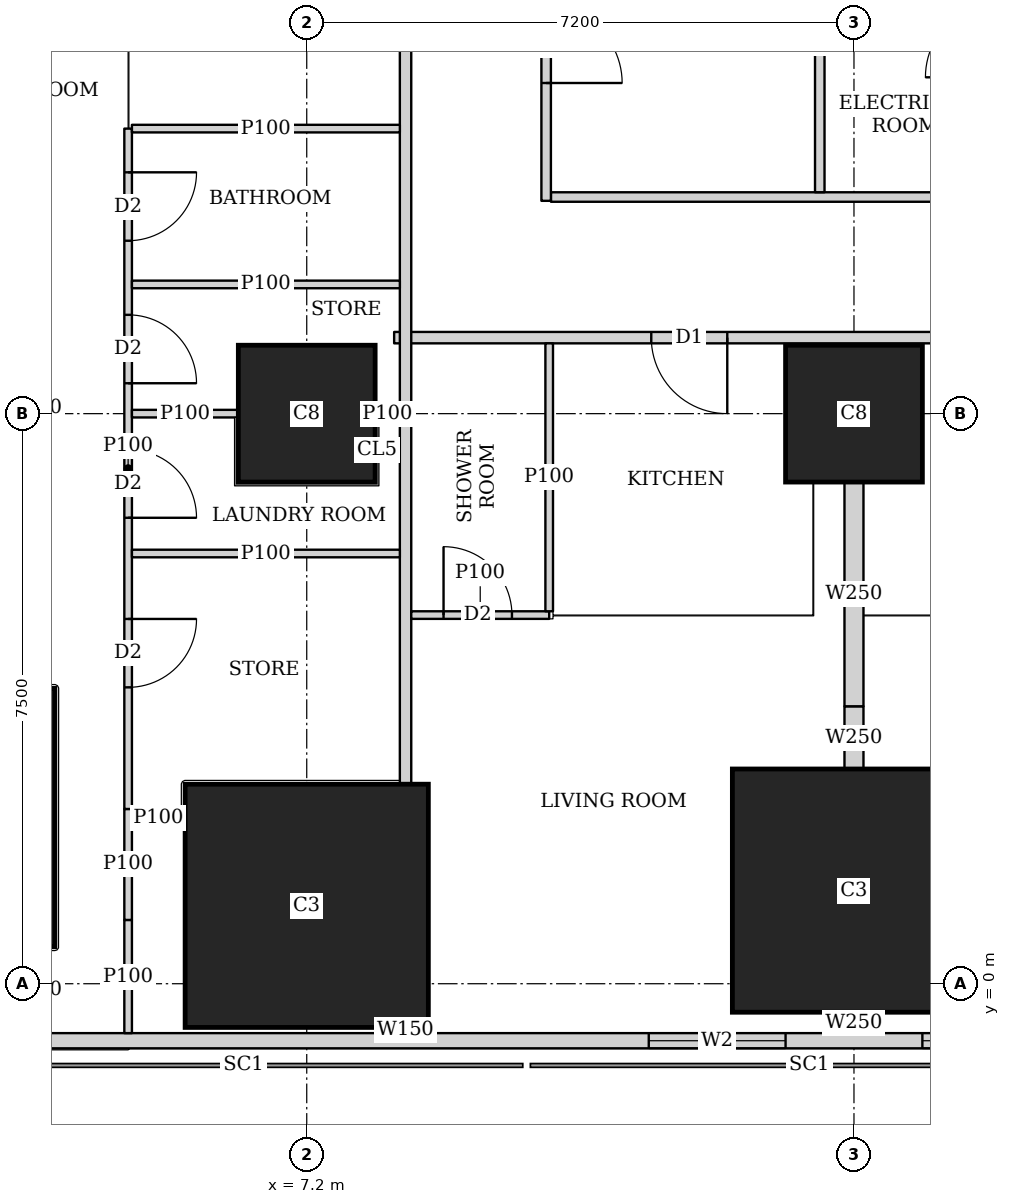
"""IFC4 building model, lengths in metres.
Left out: names, types, materials, properties, quantities, classifications, styles, units other than length and angle.
Written with IfcOpenShell. Run it as: python <this file> out.ifc"""

import sys

from ifc_helpers import new_model, si_unit, direction, frame, frame_2d, origin, origin_2d, place, context, subcontext, project, spatial, rectangle, extrude, element, fill, save


model = new_model("IFC4")
c1 = context("Model", 3, precision=1e-05, world=origin(), true_north=direction((0.0, 1.0)))
c2 = subcontext(c1, "Body", "Model", "MODEL_VIEW")
j1 = project(units=[si_unit("LENGTHUNIT", "METRE"), si_unit("PLANEANGLEUNIT", "RADIAN")], contexts=[c1])
p1 = place(None, origin())
s1 = spatial("IfcSite", under=j1, at=p1, CompositionType="ELEMENT")
p2 = place(p1, origin())
s2 = spatial("IfcBuilding", under=s1, at=p2, CompositionType="ELEMENT")
p3 = place(p2, frame((0.0, 0.0, 20.0)))
s3 = spatial("IfcBuildingStorey", under=s2, at=p3, CompositionType="ELEMENT", Elevation=20.0)
p4 = place(p3, frame((7.2, 1.025, -0.3), z_axis=(0.0, 0.0, 1.0), x_axis=(1.0, 0.0, 0.0)))
e1 = element("IfcColumn", 1, at=p4, inside=s3, PredefinedType="COLUMN", context=c2, shape_type="SweptSolid", body=[
    extrude(rectangle(XDim=3.2, YDim=3.2, at=origin_2d()), origin(), (0.0, 0.0, 1.0), 4.05),
])
p5 = place(p3, frame((14.4, 1.225, 0.0), z_axis=(0.0, 0.0, 1.0), x_axis=(1.0, 0.0, 0.0)))
e2 = element("IfcColumn", 2, at=p5, inside=s3, PredefinedType="COLUMN", context=c2, shape_type="SweptSolid", body=[
    extrude(rectangle(XDim=3.2, YDim=3.2, at=origin_2d()), origin(), (0.0, 0.0, 1.0), 3.75),
])
p6 = place(p3, frame((2.186, 2.186, 0.0), z_axis=(0.0, 0.0, 1.0), x_axis=(1.0, 0.0, 0.0)))
e3 = element("IfcColumn", 3, at=p6, inside=s3, PredefinedType="COLUMN", context=c2, shape_type="SweptSolid", body=[
    extrude(rectangle(XDim=3.4, YDim=3.4, at=origin_2d()), origin(), (0.0, 0.0, 1.0), 3.75),
])
for number, where, z_axis, x_axis in (
    (4, (7.2, 7.5, 0.0), (0.0, 0.0, 1.0), (1.0, 0.0, 0.0)),
    (5, (14.4, 7.5, 0.0), (0.0, 0.0, 1.0), (1.0, 0.0, 0.0)),
):
    element("IfcColumn", number, at=place(p3, frame(where, z_axis=z_axis, x_axis=x_axis)), inside=s3, PredefinedType="COLUMN", context=c2, shape_type="SweptSolid", body=[
        extrude(rectangle(XDim=1.8, YDim=1.8, at=origin_2d()), origin(), (0.0, 0.0, 1.0), 3.75),
    ])
p7 = place(p3, frame((2.163, -0.75, 0.0), z_axis=(0.0, 0.0, 1.0), x_axis=(1.0, 0.0, 0.0)))
e6 = element("IfcWall", 6, at=p7, inside=s3, PredefinedType="SOLIDWALL", context=c2, shape_type="SweptSolid", body=[
    extrude(rectangle(XDim=45.628, YDim=0.2, at=frame_2d((22.814, 0.0))), origin(), (0.0, 0.0, 1.0), 3.5),
])
p8 = place(p7, frame((9.537, 0.0, 0.9)))
e7 = element("IfcOpeningElement", 7, at=p8, cuts=e6, PredefinedType="OPENING", context=c2, shape_type="SweptSolid", body=[
    extrude(rectangle(XDim=1.8, YDim=1.5, at=frame_2d((0.9, 0.75))), frame((0.0, 0.11, 0.0), z_axis=(0.0, -1.0, 0.0), x_axis=(1.0, 0.0, 0.0)), (0.0, 0.0, 1.0), 0.22),
])
p9 = place(p7, frame((13.137, 0.0, 0.9)))
e8 = element("IfcOpeningElement", 8, at=p9, cuts=e6, PredefinedType="OPENING", context=c2, shape_type="SweptSolid", body=[
    extrude(rectangle(XDim=1.8, YDim=1.5, at=frame_2d((0.9, 0.75))), frame((0.0, 0.11, 0.0), z_axis=(0.0, -1.0, 0.0), x_axis=(1.0, 0.0, 0.0)), (0.0, 0.0, 1.0), 0.22),
])
p10 = place(p7, frame((16.737, 0.0, 0.9)))
e9 = element("IfcOpeningElement", 9, at=p10, cuts=e6, PredefinedType="OPENING", context=c2, shape_type="SweptSolid", body=[
    extrude(rectangle(XDim=1.8, YDim=1.5, at=frame_2d((0.9, 0.75))), frame((0.0, 0.11, 0.0), z_axis=(0.0, -1.0, 0.0), x_axis=(1.0, 0.0, 0.0)), (0.0, 0.0, 1.0), 0.22),
])
p11 = place(p7, frame((20.337, 0.0, 0.9)))
e10 = element("IfcOpeningElement", 10, at=p11, cuts=e6, PredefinedType="OPENING", context=c2, shape_type="SweptSolid", body=[
    extrude(rectangle(XDim=1.8, YDim=1.5, at=frame_2d((0.9, 0.75))), frame((0.0, 0.11, 0.0), z_axis=(0.0, -1.0, 0.0), x_axis=(1.0, 0.0, 0.0)), (0.0, 0.0, 1.0), 0.22),
])
p12 = place(p7, frame((23.937, 0.0, 0.9)))
e11 = element("IfcOpeningElement", 11, at=p12, cuts=e6, PredefinedType="OPENING", context=c2, shape_type="SweptSolid", body=[
    extrude(rectangle(XDim=1.8, YDim=1.5, at=frame_2d((0.9, 0.75))), frame((0.0, 0.11, 0.0), z_axis=(0.0, -1.0, 0.0), x_axis=(1.0, 0.0, 0.0)), (0.0, 0.0, 1.0), 0.22),
])
p13 = place(p7, frame((27.537, 0.0, 0.9)))
e12 = element("IfcOpeningElement", 12, at=p13, cuts=e6, PredefinedType="OPENING", context=c2, shape_type="SweptSolid", body=[
    extrude(rectangle(XDim=1.8, YDim=1.5, at=frame_2d((0.9, 0.75))), frame((0.0, 0.11, 0.0), z_axis=(0.0, -1.0, 0.0), x_axis=(1.0, 0.0, 0.0)), (0.0, 0.0, 1.0), 0.22),
])
p14 = place(p7, frame((31.137, 0.0, 0.9)))
e13 = element("IfcOpeningElement", 13, at=p14, cuts=e6, PredefinedType="OPENING", context=c2, shape_type="SweptSolid", body=[
    extrude(rectangle(XDim=1.8, YDim=1.5, at=frame_2d((0.9, 0.75))), frame((0.0, 0.11, 0.0), z_axis=(0.0, -1.0, 0.0), x_axis=(1.0, 0.0, 0.0)), (0.0, 0.0, 1.0), 0.22),
])
p15 = place(p7, frame((34.737, 0.0, 0.9)))
e14 = element("IfcOpeningElement", 14, at=p15, cuts=e6, PredefinedType="OPENING", context=c2, shape_type="SweptSolid", body=[
    extrude(rectangle(XDim=1.8, YDim=1.5, at=frame_2d((0.9, 0.75))), frame((0.0, 0.11, 0.0), z_axis=(0.0, -1.0, 0.0), x_axis=(1.0, 0.0, 0.0)), (0.0, 0.0, 1.0), 0.22),
])
p16 = place(p3, frame((8.5, -0.65, 0.0), z_axis=(0.0, 0.0, 1.0), x_axis=(0.0, 1.0, 0.0)))
e15 = element("IfcWall", 15, at=p16, inside=s3, PredefinedType="SOLIDWALL", context=c2, shape_type="SweptSolid", body=[
    extrude(rectangle(XDim=0.074, YDim=0.15, at=frame_2d((0.037, 0.0))), origin(), (0.0, 0.0, 1.0), 3.5),
])
p17 = place(p3, frame((8.5, 2.626, 0.0), z_axis=(0.0, 0.0, 1.0), x_axis=(0.0, 1.0, 0.0)))
e16 = element("IfcWall", 16, at=p17, inside=s3, PredefinedType="SOLIDWALL", context=c2, shape_type="SweptSolid", body=[
    extrude(rectangle(XDim=39.773, YDim=0.15, at=frame_2d((19.886, 0.0))), origin(), (0.0, 0.0, 1.0), 2.05),
])
p18 = place(p17, frame((9.786, 0.0, 0.0)))
e17 = element("IfcOpeningElement", 17, at=p18, cuts=e16, PredefinedType="OPENING", context=c2, shape_type="SweptSolid", body=[
    extrude(rectangle(XDim=1.0, YDim=2.0, at=frame_2d((0.5, 1.0))), frame((0.0, 0.085, 0.0), z_axis=(0.0, -1.0, 0.0), x_axis=(1.0, 0.0, 0.0)), (0.0, 0.0, 1.0), 0.17),
])
p19 = place(p17, frame((13.961, 0.0, 0.0)))
e18 = element("IfcOpeningElement", 18, at=p19, cuts=e16, PredefinedType="OPENING", context=c2, shape_type="SweptSolid", body=[
    extrude(rectangle(XDim=1.0, YDim=2.0, at=frame_2d((0.5, 1.0))), frame((0.0, 0.085, 0.0), z_axis=(0.0, -1.0, 0.0), x_axis=(1.0, 0.0, 0.0)), (0.0, 0.0, 1.0), 0.17),
])
p20 = place(p17, frame((24.787, 0.0, 0.0)))
e19 = element("IfcOpeningElement", 19, at=p20, cuts=e16, PredefinedType="OPENING", context=c2, shape_type="SweptSolid", body=[
    extrude(rectangle(XDim=1.0, YDim=2.0, at=frame_2d((0.5, 1.0))), frame((0.0, 0.085, 0.0), z_axis=(0.0, -1.0, 0.0), x_axis=(1.0, 0.0, 0.0)), (0.0, 0.0, 1.0), 0.17),
])
p21 = place(p17, frame((32.287, 0.0, 0.0)))
e20 = element("IfcOpeningElement", 20, at=p21, cuts=e16, PredefinedType="OPENING", context=c2, shape_type="SweptSolid", body=[
    extrude(rectangle(XDim=1.0, YDim=2.0, at=frame_2d((0.5, 1.0))), frame((0.0, 0.085, 0.0), z_axis=(0.0, -1.0, 0.0), x_axis=(1.0, 0.0, 0.0)), (0.0, 0.0, 1.0), 0.17),
])
p22 = place(p3, frame((40.054, 8.5, 0.0), z_axis=(0.0, 0.0, 1.0), x_axis=(-1.0, 0.0, 0.0)))
e21 = element("IfcWall", 21, at=p22, inside=s3, PredefinedType="SOLIDWALL", context=c2, shape_type="SweptSolid", body=[
    extrude(rectangle(XDim=31.704, YDim=0.15, at=frame_2d((15.852, 0.0))), origin(), (0.0, 0.0, 1.0), 3.5),
])
p23 = place(p22, frame((27.321, 0.0, 0.0)))
e22 = element("IfcOpeningElement", 22, at=p23, cuts=e21, PredefinedType="OPENING", context=c2, shape_type="SweptSolid", body=[
    extrude(rectangle(XDim=1.0, YDim=2.1, at=frame_2d((0.5, 1.05))), frame((0.0, 0.085, 0.0), z_axis=(0.0, -1.0, 0.0), x_axis=(1.0, 0.0, 0.0)), (0.0, 0.0, 1.0), 0.17),
])
p24 = place(p22, frame((23.054, 0.0, 0.0)))
e23 = element("IfcOpeningElement", 23, at=p24, cuts=e21, PredefinedType="OPENING", context=c2, shape_type="SweptSolid", body=[
    extrude(rectangle(XDim=1.0, YDim=2.1, at=frame_2d((0.5, 1.05))), frame((0.0, 0.085, 0.0), z_axis=(0.0, -1.0, 0.0), x_axis=(1.0, 0.0, 0.0)), (0.0, 0.0, 1.0), 0.17),
])
p25 = place(p22, frame((15.754, 0.0, 0.0)))
e24 = element("IfcOpeningElement", 24, at=p25, cuts=e21, PredefinedType="OPENING", context=c2, shape_type="SweptSolid", body=[
    extrude(rectangle(XDim=1.0, YDim=2.1, at=frame_2d((0.5, 1.05))), frame((0.0, 0.085, 0.0), z_axis=(0.0, -1.0, 0.0), x_axis=(1.0, 0.0, 0.0)), (0.0, 0.0, 1.0), 0.17),
])
p26 = place(p22, frame((5.754, 0.0, 0.0)))
e25 = element("IfcOpeningElement", 25, at=p26, cuts=e21, PredefinedType="OPENING", context=c2, shape_type="SweptSolid", body=[
    extrude(rectangle(XDim=1.0, YDim=2.1, at=frame_2d((0.5, 1.05))), frame((0.0, 0.085, 0.0), z_axis=(0.0, -1.0, 0.0), x_axis=(1.0, 0.0, 0.0)), (0.0, 0.0, 1.0), 0.17),
])
p27 = place(p3, frame((4.85, -0.65, 0.0), z_axis=(0.0, 0.0, 1.0), x_axis=(0.0, 1.0, 0.0)))
e26 = element("IfcWall", 26, at=p27, inside=s3, PredefinedType="PARTITIONING", context=c2, shape_type="SweptSolid", body=[
    extrude(rectangle(XDim=1.489, YDim=0.1, at=frame_2d((0.745, 0.0))), origin(), (0.0, 0.0, 1.0), 3.5),
])
p28 = place(p3, frame((4.85, 0.839, 0.0), z_axis=(0.0, 0.0, 1.0), x_axis=(0.0, 1.0, 0.0)))
e27 = element("IfcWall", 27, at=p28, inside=s3, PredefinedType="PARTITIONING", context=c2, shape_type="SweptSolid", body=[
    extrude(rectangle(XDim=1.46, YDim=0.1, at=frame_2d((0.73, 0.0))), origin(), (0.0, 0.0, 1.0), 2.1),
])
p29 = place(p3, frame((4.85, 2.299, 0.0), z_axis=(0.0, 0.0, 1.0), x_axis=(0.0, 1.0, 0.0)))
e28 = element("IfcWall", 28, at=p29, inside=s3, PredefinedType="PARTITIONING", context=c2, shape_type="SweptSolid", body=[
    extrude(rectangle(XDim=8.951, YDim=0.1, at=frame_2d((4.476, 0.0))), origin(), (0.0, 0.0, 1.0), 3.5),
])
p30 = place(p29, frame((7.476, 0.0, 0.0)))
e29 = element("IfcOpeningElement", 29, at=p30, cuts=e28, PredefinedType="OPENING", context=c2, shape_type="SweptSolid", body=[
    extrude(rectangle(XDim=0.9, YDim=2.1, at=frame_2d((0.45, 1.05))), frame((0.0, 0.06, 0.0), z_axis=(0.0, -1.0, 0.0), x_axis=(1.0, 0.0, 0.0)), (0.0, 0.0, 1.0), 0.12),
])
p31 = place(p29, frame((3.831, 0.0, 0.0)))
e30 = element("IfcOpeningElement", 30, at=p31, cuts=e28, PredefinedType="OPENING", context=c2, shape_type="SweptSolid", body=[
    extrude(rectangle(XDim=0.9, YDim=2.1, at=frame_2d((0.45, 1.05))), frame((0.0, 0.06, 0.0), z_axis=(0.0, -1.0, 0.0), x_axis=(1.0, 0.0, 0.0)), (0.0, 0.0, 1.0), 0.12),
])
p32 = place(p29, frame((5.601, 0.0, 0.0)))
e31 = element("IfcOpeningElement", 31, at=p32, cuts=e28, PredefinedType="OPENING", context=c2, shape_type="SweptSolid", body=[
    extrude(rectangle(XDim=0.9, YDim=2.1, at=frame_2d((0.45, 1.05))), frame((0.0, 0.06, 0.0), z_axis=(0.0, -1.0, 0.0), x_axis=(1.0, 0.0, 0.0)), (0.0, 0.0, 1.0), 0.12),
])
p33 = place(p29, frame((1.6, 0.0, 0.0)))
e32 = element("IfcOpeningElement", 32, at=p33, cuts=e28, PredefinedType="OPENING", context=c2, shape_type="SweptSolid", body=[
    extrude(rectangle(XDim=0.9, YDim=2.1, at=frame_2d((0.45, 1.05))), frame((0.0, 0.06, 0.0), z_axis=(0.0, -1.0, 0.0), x_axis=(1.0, 0.0, 0.0)), (0.0, 0.0, 1.0), 0.12),
])
p34 = place(p3, frame((4.9, 2.186, 0.0), z_axis=(0.0, 0.0, 1.0), x_axis=(1.0, 0.0, 0.0)))
e33 = element("IfcWall", 33, at=p34, inside=s3, PredefinedType="PARTITIONING", context=c2, shape_type="SweptSolid", body=[
    extrude(rectangle(XDim=0.699, YDim=0.1, at=frame_2d((0.35, 0.0))), origin(), (0.0, 0.0, 1.0), 2.1),
])
p35 = place(p3, frame((4.9, 7.5, 0.0), z_axis=(0.0, 0.0, 1.0), x_axis=(1.0, 0.0, 0.0)))
e34 = element("IfcWall", 34, at=p35, inside=s3, PredefinedType="PARTITIONING", context=c2, shape_type="SweptSolid", body=[
    extrude(rectangle(XDim=1.399, YDim=0.1, at=frame_2d((0.7, 0.0))), origin(), (0.0, 0.0, 1.0), 3.5),
])
p36 = place(p3, frame((8.101, 7.5, 0.0), z_axis=(0.0, 0.0, 1.0), x_axis=(1.0, 0.0, 0.0)))
e35 = element("IfcWall", 35, at=p36, inside=s3, PredefinedType="PARTITIONING", context=c2, shape_type="SweptSolid", body=[
    extrude(rectangle(XDim=0.324, YDim=0.1, at=frame_2d((0.162, 0.0))), origin(), (0.0, 0.0, 1.0), 3.5),
])
for number, where, z_axis, x_axis in (
    (36, (4.9, 11.25, 0.0), (0.0, 0.0, 1.0), (1.0, 0.0, 0.0)),
    (37, (4.9, 9.2, 0.0), (0.0, 0.0, 1.0), (1.0, 0.0, 0.0)),
    (38, (4.9, 5.66, 0.0), (0.0, 0.0, 1.0), (1.0, 0.0, 0.0)),
):
    element("IfcWall", number, at=place(p3, frame(where, z_axis=z_axis, x_axis=x_axis)), inside=s3, PredefinedType="PARTITIONING", context=c2, shape_type="SweptSolid", body=[
        extrude(rectangle(XDim=3.525, YDim=0.1, at=frame_2d((1.763, 0.0))), origin(), (0.0, 0.0, 1.0), 3.5),
    ])
p37 = place(p3, frame((10.39, 4.85, 0.0), z_axis=(0.0, 0.0, 1.0), x_axis=(-1.0, 0.0, 0.0)))
e39 = element("IfcWall", 39, at=p37, inside=s3, PredefinedType="PARTITIONING", context=c2, shape_type="SweptSolid", body=[
    extrude(rectangle(XDim=1.815, YDim=0.1, at=frame_2d((0.907, 0.0))), origin(), (0.0, 0.0, 1.0), 3.5),
])
p38 = place(p37, frame((0.49, 0.0, 0.0)))
e40 = element("IfcOpeningElement", 40, at=p38, cuts=e39, PredefinedType="OPENING", context=c2, shape_type="SweptSolid", body=[
    extrude(rectangle(XDim=0.9, YDim=2.1, at=frame_2d((0.45, 1.05))), frame((0.0, 0.06, 0.0), z_axis=(0.0, -1.0, 0.0), x_axis=(1.0, 0.0, 0.0)), (0.0, 0.0, 1.0), 0.12),
])
p39 = place(p3, frame((10.39, 4.9, 0.0), z_axis=(0.0, 0.0, 1.0), x_axis=(0.0, 1.0, 0.0)))
e41 = element("IfcWall", 41, at=p39, inside=s3, PredefinedType="PARTITIONING", context=c2, shape_type="SweptSolid", body=[
    extrude(rectangle(XDim=3.525, YDim=0.1, at=frame_2d((1.763, 0.0))), origin(), (0.0, 0.0, 1.0), 3.5),
])
p40 = place(p3, frame((14.4, -0.65, 0.0), z_axis=(0.0, 0.0, 1.0), x_axis=(0.0, 1.0, 0.0)))
e42 = element("IfcWall", 42, at=p40, inside=s3, PredefinedType="SOLIDWALL", context=c2, shape_type="SweptSolid", body=[
    extrude(rectangle(XDim=0.274, YDim=0.25, at=frame_2d((0.137, 0.0))), origin(), (0.0, 0.0, 1.0), 2.05),
])
p41 = place(p3, frame((14.4, 2.826, 0.0), z_axis=(0.0, 0.0, 1.0), x_axis=(0.0, 1.0, 0.0)))
e43 = element("IfcWall", 43, at=p41, inside=s3, PredefinedType="SOLIDWALL", context=c2, shape_type="SweptSolid", body=[
    extrude(rectangle(XDim=0.824, YDim=0.25, at=frame_2d((0.412, 0.0))), origin(), (0.0, 0.0, 1.0), 2.05),
])
p42 = place(p3, frame((14.4, 3.65, 0.0), z_axis=(0.0, 0.0, 1.0), x_axis=(0.0, 1.0, 0.0)))
e44 = element("IfcWall", 44, at=p42, inside=s3, PredefinedType="SOLIDWALL", context=c2, shape_type="SweptSolid", body=[
    extrude(rectangle(XDim=2.949, YDim=0.25, at=frame_2d((1.475, 0.0))), origin(), (0.0, 0.0, 1.0), 3.5),
])
p43 = place(p3, frame((10.35, 10.3, 0.0), z_axis=(0.0, 0.0, 1.0), x_axis=(0.0, 1.0, 0.0)))
e45 = element("IfcWall", 45, at=p43, inside=s3, PredefinedType="PARTITIONING", context=c2, shape_type="SweptSolid", body=[
    extrude(rectangle(XDim=15.8, YDim=0.125, at=frame_2d((7.9, 0.0))), origin(), (0.0, 0.0, 1.0), 3.5),
])
p44 = place(p43, frame((1.55, 0.0, 0.0)))
e46 = element("IfcOpeningElement", 46, at=p44, cuts=e45, PredefinedType="OPENING", context=c2, shape_type="SweptSolid", body=[
    extrude(rectangle(XDim=1.0, YDim=2.1, at=frame_2d((0.5, 1.05))), frame((0.0, 0.073, 0.0), z_axis=(0.0, -1.0, 0.0), x_axis=(1.0, 0.0, 0.0)), (0.0, 0.0, 1.0), 0.145),
])
p45 = place(p43, frame((5.7, 0.0, 0.0)))
e47 = element("IfcOpeningElement", 47, at=p45, cuts=e45, PredefinedType="OPENING", context=c2, shape_type="SweptSolid", body=[
    extrude(rectangle(XDim=1.0, YDim=2.1, at=frame_2d((0.5, 1.05))), frame((0.0, 0.073, 0.0), z_axis=(0.0, -1.0, 0.0), x_axis=(1.0, 0.0, 0.0)), (0.0, 0.0, 1.0), 0.145),
])
p46 = place(p43, frame((11.55, 0.0, 0.0)))
e48 = element("IfcOpeningElement", 48, at=p46, cuts=e45, PredefinedType="OPENING", context=c2, shape_type="SweptSolid", body=[
    extrude(rectangle(XDim=1.0, YDim=2.1, at=frame_2d((0.5, 1.05))), frame((0.0, 0.073, 0.0), z_axis=(0.0, -1.0, 0.0), x_axis=(1.0, 0.0, 0.0)), (0.0, 0.0, 1.0), 0.145),
])
p47 = place(p3, frame((13.95, 10.413, 0.0), z_axis=(0.0, 0.0, 1.0), x_axis=(0.0, 1.0, 0.0)))
e49 = element("IfcWall", 49, at=p47, inside=s3, PredefinedType="PARTITIONING", context=c2, shape_type="SweptSolid", body=[
    extrude(rectangle(XDim=3.925, YDim=0.125, at=frame_2d((1.962, 0.0))), origin(), (0.0, 0.0, 1.0), 3.5),
])
p48 = place(p3, frame((10.413, 10.35, 0.0), z_axis=(0.0, 0.0, 1.0), x_axis=(1.0, 0.0, 0.0)))
e50 = element("IfcWall", 50, at=p48, inside=s3, PredefinedType="PARTITIONING", context=c2, shape_type="SweptSolid", body=[
    extrude(rectangle(XDim=10.837, YDim=0.125, at=frame_2d((5.418, 0.0))), origin(), (0.0, 0.0, 1.0), 3.5),
])
p49 = place(p48, frame((7.582, 0.0, 0.0)))
e51 = element("IfcOpeningElement", 51, at=p49, cuts=e50, PredefinedType="OPENING", context=c2, shape_type="SweptSolid", body=[
    extrude(rectangle(XDim=1.8, YDim=2.1, at=frame_2d((0.9, 1.05))), frame((0.0, 0.073, 0.0), z_axis=(0.0, -1.0, 0.0), x_axis=(1.0, 0.0, 0.0)), (0.0, 0.0, 1.0), 0.145),
])
p50 = place(p8, origin())
e52 = element("IfcWindow", 52, at=p50, inside=s3, PartitioningType="SINGLE_PANEL", PredefinedType="WINDOW", context=c2, shape_type="SweptSolid", body=[
    extrude(rectangle(XDim=1.8, YDim=1.5, at=frame_2d((0.9, 0.75))), frame((0.0, 0.03, 0.0), z_axis=(0.0, -1.0, 0.0), x_axis=(1.0, 0.0, 0.0)), (0.0, 0.0, 1.0), 0.06),
])
fill(e7, e52)
p51 = place(p9, origin())
e53 = element("IfcWindow", 53, at=p51, inside=s3, PartitioningType="SINGLE_PANEL", PredefinedType="WINDOW", context=c2, shape_type="SweptSolid", body=[
    extrude(rectangle(XDim=1.8, YDim=1.5, at=frame_2d((0.9, 0.75))), frame((0.0, 0.03, 0.0), z_axis=(0.0, -1.0, 0.0), x_axis=(1.0, 0.0, 0.0)), (0.0, 0.0, 1.0), 0.06),
])
fill(e8, e53)
p52 = place(p30, origin())
e54 = element("IfcDoor", 54, at=p52, inside=s3, OperationType="SINGLE_SWING_LEFT", PredefinedType="DOOR", context=c2, shape_type="SweptSolid", body=[
    extrude(rectangle(XDim=0.9, YDim=2.1, at=frame_2d((0.45, 1.05))), frame((0.0, 0.025, 0.0), z_axis=(0.0, -1.0, 0.0), x_axis=(1.0, 0.0, 0.0)), (0.0, 0.0, 1.0), 0.05),
])
fill(e29, e54)
p53 = place(p31, origin())
e55 = element("IfcDoor", 55, at=p53, inside=s3, OperationType="SINGLE_SWING_RIGHT", PredefinedType="DOOR", context=c2, shape_type="SweptSolid", body=[
    extrude(rectangle(XDim=0.9, YDim=2.1, at=frame_2d((0.45, 1.05))), frame((0.0, 0.025, 0.0), z_axis=(0.0, -1.0, 0.0), x_axis=(1.0, 0.0, 0.0)), (0.0, 0.0, 1.0), 0.05),
])
fill(e30, e55)
p54 = place(p32, origin())
e56 = element("IfcDoor", 56, at=p54, inside=s3, OperationType="SINGLE_SWING_RIGHT", PredefinedType="DOOR", context=c2, shape_type="SweptSolid", body=[
    extrude(rectangle(XDim=0.9, YDim=2.1, at=frame_2d((0.45, 1.05))), frame((0.0, 0.025, 0.0), z_axis=(0.0, -1.0, 0.0), x_axis=(1.0, 0.0, 0.0)), (0.0, 0.0, 1.0), 0.05),
])
fill(e31, e56)
p55 = place(p33, origin())
e57 = element("IfcDoor", 57, at=p55, inside=s3, OperationType="SINGLE_SWING_LEFT", PredefinedType="DOOR", context=c2, shape_type="SweptSolid", body=[
    extrude(rectangle(XDim=0.9, YDim=2.1, at=frame_2d((0.45, 1.05))), frame((0.0, 0.025, 0.0), z_axis=(0.0, -1.0, 0.0), x_axis=(1.0, 0.0, 0.0)), (0.0, 0.0, 1.0), 0.05),
])
fill(e32, e57)
p56 = place(p38, origin())
e58 = element("IfcDoor", 58, at=p56, inside=s3, OperationType="SINGLE_SWING_LEFT", PredefinedType="DOOR", context=c2, shape_type="SweptSolid", body=[
    extrude(rectangle(XDim=0.9, YDim=2.1, at=frame_2d((0.45, 1.05))), frame((0.0, 0.025, 0.0), z_axis=(0.0, -1.0, 0.0), x_axis=(1.0, 0.0, 0.0)), (0.0, 0.0, 1.0), 0.05),
])
fill(e40, e58)
p57 = place(p23, origin())
e59 = element("IfcDoor", 59, at=p57, inside=s3, OperationType="SINGLE_SWING_LEFT", PredefinedType="DOOR", context=c2, shape_type="SweptSolid", body=[
    extrude(rectangle(XDim=1.0, YDim=2.1, at=frame_2d((0.5, 1.05))), frame((0.0, 0.025, 0.0), z_axis=(0.0, -1.0, 0.0), x_axis=(1.0, 0.0, 0.0)), (0.0, 0.0, 1.0), 0.05),
])
fill(e22, e59)
p58 = place(p44, origin())
e60 = element("IfcDoor", 60, at=p58, inside=s3, OperationType="SINGLE_SWING_RIGHT", PredefinedType="DOOR", context=c2, shape_type="SweptSolid", body=[
    extrude(rectangle(XDim=1.0, YDim=2.1, at=frame_2d((0.5, 1.05))), frame((0.0, 0.025, 0.0), z_axis=(0.0, -1.0, 0.0), x_axis=(1.0, 0.0, 0.0)), (0.0, 0.0, 1.0), 0.05),
])
fill(e46, e60)
save(model, sys.argv[1])
